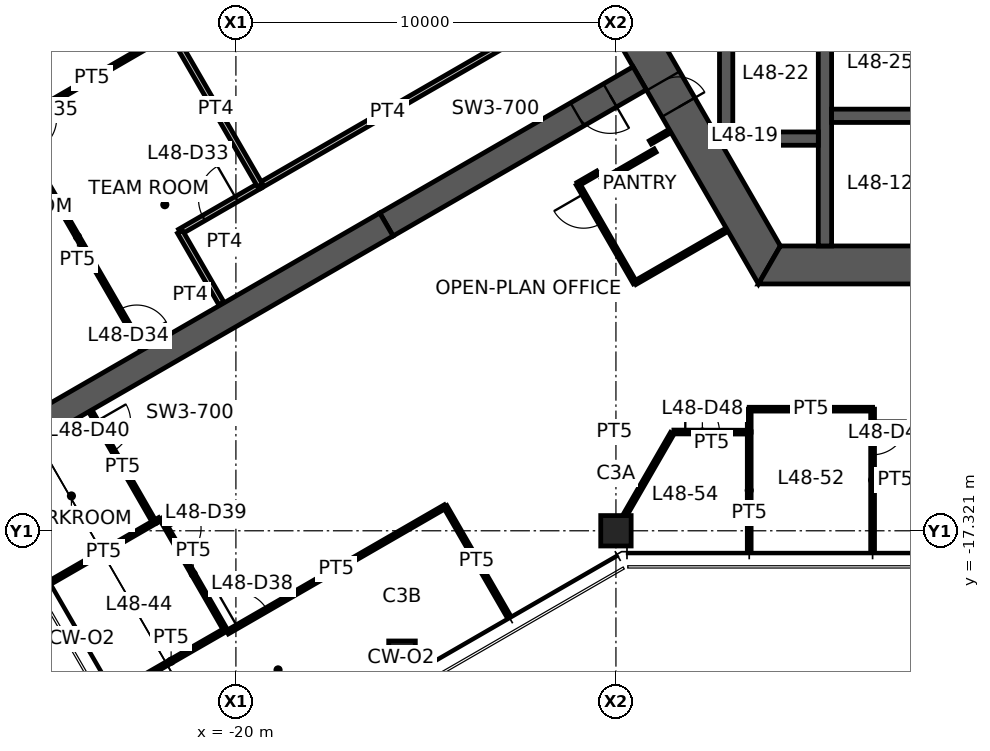
"""IFC4 building model, lengths in metres.
Left out: names, types, materials, properties, quantities, classifications, styles, units other than length and angle.
Written with IfcOpenShell. Run it as: python <this file> out.ifc"""

import sys

from ifc_helpers import new_model, si_unit, direction, frame, frame_2d, origin, origin_2d, place, context, subcontext, project, spatial, polyline, rectangle, hollow_rectangle, outline, extrude, element, fill, save


model = new_model("IFC4")
c1 = context("Model", 3, precision=1e-05, world=origin(), true_north=direction((0.0, 1.0)))
c2 = subcontext(c1, "Body", "Model", "MODEL_VIEW")
j1 = project(units=[si_unit("LENGTHUNIT", "METRE"), si_unit("PLANEANGLEUNIT", "RADIAN")], contexts=[c1])
p1 = place(None, origin())
s1 = spatial("IfcSite", under=j1, at=p1, CompositionType="ELEMENT")
p2 = place(p1, origin())
s2 = spatial("IfcBuilding", under=s1, at=p2, CompositionType="ELEMENT")
p3 = place(p2, frame((0.0, 0.0, 191.6)))
s3 = spatial("IfcBuildingStorey", under=s2, at=p3, CompositionType="ELEMENT", Elevation=191.6)
p4 = place(p3, frame((-10.0, -17.321, 0.0), z_axis=(0.0, 0.0, 1.0), x_axis=(1.0, 0.0, 0.0)))
e1 = element("IfcColumn", 1, at=p4, inside=s3, PredefinedType="COLUMN", context=c2, shape_type="SweptSolid", body=[
    extrude(hollow_rectangle(XDim=0.8, YDim=0.8, WallThickness=0.045, at=origin_2d()), origin(), (0.0, 0.0, 1.0), 3.9),
])
p5 = place(p3, frame((-15.629, -20.571, 0.0), z_axis=(0.0, 0.0, 1.0), x_axis=(1.0, 0.0, 0.0)))
e2 = element("IfcColumn", 2, at=p5, inside=s3, PredefinedType="COLUMN", context=c2, shape_type="SweptSolid", body=[
    extrude(hollow_rectangle(XDim=0.7, YDim=0.7, WallThickness=0.036, at=origin_2d()), origin(), (0.0, 0.0, 1.0), 3.9),
])
p6 = place(p3, frame((-11.922, 0.0, 0.0), z_axis=(0.0, 0.0, 1.0), x_axis=(0.500004296715, -0.866022923061, 0.0)))
e3 = element("IfcWall", 3, at=p6, inside=s3, PredefinedType="SHEAR", context=c2, shape_type="SweptSolid", body=[
    extrude(outline(polyline([(-0.289, -0.5), (6.331, -0.5), (7.131, -0.5), (12.211, -0.5), (11.634, 0.5), (7.131, 0.5), (6.331, 0.5), (0.289, 0.5), (-0.289, -0.5)])), origin(), (0.0, 0.0, 1.0), 3.9),
])
p7 = place(p6, frame((6.331, 0.0, 0.0)))
e4 = element("IfcOpeningElement", 4, at=p7, cuts=e3, PredefinedType="OPENING", context=c2, shape_type="SweptSolid", body=[
    extrude(rectangle(XDim=0.8, YDim=2.1, at=frame_2d((0.4, 1.05))), frame((0.0, 0.51, 0.0), z_axis=(0.0, -1.0, 0.0), x_axis=(1.0, 0.0, 0.0)), (0.0, 0.0, 1.0), 1.02),
])
p8 = place(p3, frame((-5.961, -10.325, 0.0), z_axis=(0.0, 0.0, 1.0), x_axis=(1.0, 0.0, 0.0)))
e5 = element("IfcWall", 5, at=p8, inside=s3, PredefinedType="SHEAR", context=c2, shape_type="SweptSolid", body=[
    extrude(outline(polyline([(-0.289, -0.5), (5.461, -0.5), (6.461, -0.5), (12.211, -0.5), (11.634, 0.5), (6.461, 0.5), (5.461, 0.5), (0.289, 0.5), (-0.289, -0.5)])), origin(), (0.0, 0.0, 1.0), 3.9),
])
p9 = place(p8, frame((5.461, 0.0, 0.0)))
e6 = element("IfcOpeningElement", 6, at=p9, cuts=e5, PredefinedType="OPENING", context=c2, shape_type="SweptSolid", body=[
    extrude(rectangle(XDim=1.0, YDim=2.1, at=frame_2d((0.5, 1.05))), frame((0.0, 0.51, 0.0), z_axis=(0.0, -1.0, 0.0), x_axis=(1.0, 0.0, 0.0)), (0.0, 0.0, 1.0), 1.02),
])
p10 = place(p3, frame((-9.375, -5.413, 0.0), z_axis=(0.0, 0.0, 1.0), x_axis=(-0.866032377459, -0.499987921047, 0.0)))
e7 = element("IfcWall", 7, at=p10, inside=s3, PredefinedType="SHEAR", context=c2, shape_type="SweptSolid", body=[
    extrude(rectangle(XDim=7.696, YDim=0.7, at=frame_2d((3.848, 0.0))), origin(), (0.0, 0.0, 1.0), 3.9),
])
p11 = place(p10, frame((0.9, 0.0, 0.0)))
e8 = element("IfcOpeningElement", 8, at=p11, cuts=e7, PredefinedType="OPENING", context=c2, shape_type="SweptSolid", body=[
    extrude(rectangle(XDim=1.0, YDim=2.1, at=frame_2d((0.5, 1.05))), frame((0.0, 0.36, 0.0), z_axis=(0.0, -1.0, 0.0), x_axis=(1.0, 0.0, 0.0)), (0.0, 0.0, 1.0), 0.72),
])
p12 = place(p3, frame((-16.039, -9.26, 0.0), z_axis=(0.0, 0.0, 1.0), x_axis=(-0.866024837091, -0.50000098154, 0.0)))
e9 = element("IfcWall", 9, at=p12, inside=s3, PredefinedType="SHEAR", context=c2, shape_type="SweptSolid", body=[
    extrude(rectangle(XDim=13.0, YDim=0.7, at=frame_2d((6.5, 0.0))), origin(), (0.0, 0.0, 1.0), 3.9),
])
p13 = place(p3, frame((-4.5, -3.775, 0.0), z_axis=(0.0, 0.0, 1.0), x_axis=(0.0, -1.0, 0.0)))
e10 = element("IfcWall", 10, at=p13, inside=s3, PredefinedType="SHEAR", context=c2, shape_type="SweptSolid", body=[
    extrude(rectangle(XDim=6.05, YDim=0.35, at=frame_2d((3.025, 0.0))), origin(), (0.0, 0.0, 1.0), 3.9),
])
p14 = place(p3, frame((-4.325, -6.4, 0.0), z_axis=(0.0, 0.0, 1.0), x_axis=(1.0, 0.0, 0.0)))
e11 = element("IfcWall", 11, at=p14, inside=s3, PredefinedType="SHEAR", context=c2, shape_type="SweptSolid", body=[
    extrude(rectangle(XDim=2.55, YDim=0.35, at=frame_2d((1.275, 0.0))), origin(), (0.0, 0.0, 1.0), 3.9),
])
p15 = place(p3, frame((-6.925, -7.0, 0.0), z_axis=(0.0, 0.0, 1.0), x_axis=(1.0, 0.0, 0.0)))
e12 = element("IfcWall", 12, at=p15, inside=s3, PredefinedType="SHEAR", context=c2, shape_type="SweptSolid", body=[
    extrude(rectangle(XDim=2.25, YDim=0.35, at=frame_2d((1.125, 0.0))), origin(), (0.0, 0.0, 1.0), 3.9),
])
p16 = place(p3, frame((-7.1, -3.775, 0.0), z_axis=(0.0, 0.0, 1.0), x_axis=(0.0, -1.0, 0.0)))
e13 = element("IfcWall", 13, at=p16, inside=s3, PredefinedType="SHEAR", context=c2, shape_type="SweptSolid", body=[
    extrude(outline(polyline([(0.0, -0.175), (3.274, -0.175), (3.4, 0.0), (3.4, 0.175), (0.0, 0.175), (0.0, -0.175)])), origin(), (0.0, 0.0, 1.0), 3.9),
])
p17 = place(p3, frame((-19.372, -8.24, 0.0), z_axis=(0.0, 0.0, 1.0), x_axis=(0.866015031168, 0.500017965468, 0.0)))
e14 = element("IfcWall", 14, at=p17, inside=s3, PredefinedType="PARTITIONING", context=c2, shape_type="SweptSolid", body=[
    extrude(rectangle(XDim=7.771, YDim=0.15, at=frame_2d((3.886, 0.0))), origin(), (0.0, 0.0, 1.0), 2.95),
])
p18 = place(p3, frame((-21.471, -9.452, 0.0), z_axis=(0.0, 0.0, 1.0), x_axis=(0.866025270247, 0.500000231294, 0.0)))
e15 = element("IfcWall", 15, at=p18, inside=s3, PredefinedType="PARTITIONING", context=c2, shape_type="SweptSolid", body=[
    extrude(rectangle(XDim=2.435, YDim=0.15, at=frame_2d((1.217, 0.0))), origin(), (0.0, 0.0, 1.0), 2.95),
])
p19 = place(p18, frame((0.717, 0.0, 0.0)))
e16 = element("IfcOpeningElement", 16, at=p19, cuts=e15, PredefinedType="OPENING", context=c2, shape_type="SweptSolid", body=[
    extrude(rectangle(XDim=1.0, YDim=2.1, at=frame_2d((0.5, 1.05))), frame((0.0, 0.085, 0.0), z_axis=(0.0, -1.0, 0.0), x_axis=(1.0, 0.0, 0.0)), (0.0, 0.0, 1.0), 0.17),
])
p20 = place(p3, frame((-20.381, -11.34, 0.0), z_axis=(0.0, 0.0, 1.0), x_axis=(-0.500029427677, 0.866008413041, 0.0)))
e17 = element("IfcWall", 17, at=p20, inside=s3, PredefinedType="PARTITIONING", context=c2, shape_type="SweptSolid", body=[
    extrude(rectangle(XDim=2.18, YDim=0.15, at=frame_2d((1.09, 0.0))), origin(), (0.0, 0.0, 1.0), 2.95),
])
p21 = place(p3, frame((-25.878, -6.627, 0.0), z_axis=(0.0, 0.0, 1.0), x_axis=(0.500502111965, -0.865735315162, 0.0)))
e18 = element("IfcWall", 18, at=p21, inside=s3, PredefinedType="PARTITIONING", context=c2, shape_type="SweptSolid", body=[
    extrude(rectangle(XDim=6.83, YDim=0.1, at=frame_2d((3.415, 0.0))), origin(), (0.0, 0.0, 1.0), 2.95),
])
p22 = place(p21, frame((5.63, 0.0, 0.0)))
e19 = element("IfcOpeningElement", 19, at=p22, cuts=e18, PredefinedType="OPENING", context=c2, shape_type="SweptSolid", body=[
    extrude(rectangle(XDim=0.9, YDim=2.1, at=frame_2d((0.45, 1.05))), frame((0.0, 0.06, 0.0), z_axis=(0.0, -1.0, 0.0), x_axis=(1.0, 0.0, 0.0)), (0.0, 0.0, 1.0), 0.12),
])
p23 = place(p3, frame((-21.695, -4.206, 0.0), z_axis=(0.0, 0.0, 1.0), x_axis=(-0.865554211136, -0.500815242963, 0.0)))
e20 = element("IfcWall", 20, at=p23, inside=s3, PredefinedType="PARTITIONING", context=c2, shape_type="SweptSolid", body=[
    extrude(rectangle(XDim=4.833, YDim=0.1, at=frame_2d((2.417, 0.0))), origin(), (0.0, 0.0, 1.0), 2.95),
])
p24 = place(p23, frame((3.633, 0.0, 0.0)))
e21 = element("IfcOpeningElement", 21, at=p24, cuts=e20, PredefinedType="OPENING", context=c2, shape_type="SweptSolid", body=[
    extrude(rectangle(XDim=0.9, YDim=2.1, at=frame_2d((0.45, 1.05))), frame((0.0, 0.06, 0.0), z_axis=(0.0, -1.0, 0.0), x_axis=(1.0, 0.0, 0.0)), (0.0, 0.0, 1.0), 0.12),
])
p25 = place(p3, frame((-19.363, -8.234, 0.0), z_axis=(0.0, 0.0, 1.0), x_axis=(-0.500877035324, 0.865518454734, 0.0)))
e22 = element("IfcWall", 22, at=p25, inside=s3, PredefinedType="PARTITIONING", context=c2, shape_type="SweptSolid", body=[
    extrude(rectangle(XDim=4.654, YDim=0.15, at=frame_2d((2.327, 0.0))), origin(), (0.0, 0.0, 1.0), 2.95),
])
p26 = place(p3, frame((-11.0, -8.198, 0.0), z_axis=(0.0, 0.0, 1.0), x_axis=(0.866131372301, 0.499816412211, 0.0)))
e23 = element("IfcWall", 23, at=p26, inside=s3, PredefinedType="PARTITIONING", context=c2, shape_type="SweptSolid", body=[
    extrude(rectangle(XDim=0.6, YDim=0.1, at=frame_2d((0.3, 0.0))), origin(), (0.0, 0.0, 1.0), 2.95),
])
p27 = place(p3, frame((-10.355, -8.115, 0.0), z_axis=(0.0, 0.0, 1.0), x_axis=(0.866094119867, 0.499880961361, 0.0)))
e24 = element("IfcWall", 24, at=p27, inside=s3, PredefinedType="PARTITIONING", context=c2, shape_type="SweptSolid", body=[
    extrude(rectangle(XDim=1.6, YDim=0.1, at=frame_2d((0.8, 0.0))), origin(), (0.0, 0.0, 1.0), 2.95),
])
p28 = place(p3, frame((-9.5, -10.796, 0.0), z_axis=(0.0, 0.0, 1.0), x_axis=(-0.499990139034, 0.866031096941, 0.0)))
e25 = element("IfcWall", 25, at=p28, inside=s3, PredefinedType="PARTITIONING", context=c2, shape_type="SweptSolid", body=[
    extrude(rectangle(XDim=3.0, YDim=0.1, at=frame_2d((1.5, 0.0))), origin(), (0.0, 0.0, 1.0), 2.95),
])
p29 = place(p28, frame((1.8, 0.0, 0.0)))
e26 = element("IfcOpeningElement", 26, at=p29, cuts=e25, PredefinedType="OPENING", context=c2, shape_type="SweptSolid", body=[
    extrude(rectangle(XDim=0.9, YDim=2.1, at=frame_2d((0.45, 1.05))), frame((0.0, 0.06, 0.0), z_axis=(0.0, -1.0, 0.0), x_axis=(1.0, 0.0, 0.0)), (0.0, 0.0, 1.0), 0.12),
])
p30 = place(p3, frame((-9.094, -7.098, 0.0), z_axis=(0.0, 0.0, 1.0), x_axis=(0.865954211699, 0.50012328804, 0.0)))
e27 = element("IfcWall", 27, at=p30, inside=s3, PredefinedType="PARTITIONING", context=c2, shape_type="SweptSolid", body=[
    extrude(rectangle(XDim=0.58, YDim=0.1, at=frame_2d((0.29, 0.0))), origin(), (0.0, 0.0, 1.0), 2.95),
])
p31 = place(p3, frame((-7.092, -9.406, 0.0), z_axis=(0.0, 0.0, 1.0), x_axis=(-0.86603494908, -0.499983466698, 0.0)))
e28 = element("IfcWall", 28, at=p31, inside=s3, PredefinedType="PARTITIONING", context=c2, shape_type="SweptSolid", body=[
    extrude(rectangle(XDim=2.78, YDim=0.1, at=frame_2d((1.39, 0.0))), origin(), (0.0, 0.0, 1.0), 2.95),
])
p32 = place(p3, frame((-23.137, -21.576, 0.0), z_axis=(0.0, 0.0, 1.0), x_axis=(0.866702770653, 0.498824926544, 0.0)))
e29 = element("IfcWall", 29, at=p32, inside=s3, PredefinedType="PARTITIONING", context=c2, shape_type="SweptSolid", body=[
    extrude(rectangle(XDim=3.306, YDim=0.1, at=frame_2d((1.653, 0.0))), origin(), (0.0, 0.0, 1.0), 2.95),
])
p33 = place(p3, frame((-20.225, -19.991, 0.0), z_axis=(0.0, 0.0, 1.0), x_axis=(0.866030817826, 0.499990622488, 0.0)))
e30 = element("IfcWall", 30, at=p33, inside=s3, PredefinedType="PARTITIONING", context=c2, shape_type="SweptSolid", body=[
    extrude(rectangle(XDim=6.62, YDim=0.1, at=frame_2d((3.31, 0.0))), origin(), (0.0, 0.0, 1.0), 2.95),
])
p34 = place(p33, frame((0.3, 0.0, 0.0)))
e31 = element("IfcOpeningElement", 31, at=p34, cuts=e30, PredefinedType="OPENING", context=c2, shape_type="SweptSolid", body=[
    extrude(rectangle(XDim=0.9, YDim=2.1, at=frame_2d((0.45, 1.05))), frame((0.0, 0.06, 0.0), z_axis=(0.0, -1.0, 0.0), x_axis=(1.0, 0.0, 0.0)), (0.0, 0.0, 1.0), 0.12),
])
p35 = place(p3, frame((-14.492, -16.681, 0.0), z_axis=(0.0, 0.0, 1.0), x_axis=(0.500008057651, -0.866020751647, 0.0)))
e32 = element("IfcWall", 32, at=p35, inside=s3, PredefinedType="PARTITIONING", context=c2, shape_type="SweptSolid", body=[
    extrude(rectangle(XDim=3.305, YDim=0.1, at=frame_2d((1.653, 0.0))), origin(), (0.0, 0.0, 1.0), 2.95),
])
p36 = place(p3, frame((-24.829, -18.646, 0.0), z_axis=(0.0, 0.0, 1.0), x_axis=(0.866002566612, 0.500039553057, 0.0)))
e33 = element("IfcWall", 33, at=p36, inside=s3, PredefinedType="PARTITIONING", context=c2, shape_type="SweptSolid", body=[
    extrude(rectangle(XDim=3.11, YDim=0.1, at=frame_2d((1.555, 0.0))), origin(), (0.0, 0.0, 1.0), 2.95),
])
p37 = place(p3, frame((-21.967, -16.993, 0.0), z_axis=(0.0, 0.0, 1.0), x_axis=(0.498972655929, -0.866617729241, 0.0)))
e34 = element("IfcWall", 34, at=p37, inside=s3, PredefinedType="PARTITIONING", context=c2, shape_type="SweptSolid", body=[
    extrude(rectangle(XDim=3.383, YDim=0.1, at=frame_2d((1.692, 0.0))), origin(), (0.0, 0.0, 1.0), 2.95),
])
p38 = place(p37, frame((0.3, 0.0, 0.0)))
e35 = element("IfcOpeningElement", 35, at=p38, cuts=e34, PredefinedType="OPENING", context=c2, shape_type="SweptSolid", body=[
    extrude(rectangle(XDim=0.9, YDim=2.1, at=frame_2d((0.45, 1.05))), frame((0.0, 0.06, 0.0), z_axis=(0.0, -1.0, 0.0), x_axis=(1.0, 0.0, 0.0)), (0.0, 0.0, 1.0), 0.12),
])
p39 = place(p3, frame((-23.822, -14.181, 0.0), z_axis=(0.0, 0.0, 1.0), x_axis=(0.498880193261, -0.866670959922, 0.0)))
e36 = element("IfcWall", 36, at=p39, inside=s3, PredefinedType="PARTITIONING", context=c2, shape_type="SweptSolid", body=[
    extrude(rectangle(XDim=3.364, YDim=0.1, at=frame_2d((1.682, 0.0))), origin(), (0.0, 0.0, 1.0), 2.95),
])
p40 = place(p39, frame((0.3, 0.0, 0.0)))
e37 = element("IfcOpeningElement", 37, at=p40, cuts=e36, PredefinedType="OPENING", context=c2, shape_type="SweptSolid", body=[
    extrude(rectangle(XDim=0.9, YDim=2.1, at=frame_2d((0.45, 1.05))), frame((0.0, 0.06, 0.0), z_axis=(0.0, -1.0, 0.0), x_axis=(1.0, 0.0, 0.0)), (0.0, 0.0, 1.0), 0.12),
])
p41 = place(p3, frame((-6.493, -17.801, 0.0), z_axis=(0.0, 0.0, 1.0), x_axis=(0.0, 1.0, 0.0)))
e38 = element("IfcWall", 38, at=p41, inside=s3, PredefinedType="PARTITIONING", context=c2, shape_type="SweptSolid", body=[
    extrude(rectangle(XDim=3.085, YDim=0.1, at=frame_2d((1.542, 0.0))), origin(), (0.0, 0.0, 1.0), 2.95),
])
p42 = place(p3, frame((-6.493, -14.725, 0.0), z_axis=(0.0, 0.0, 1.0), x_axis=(0.0, 1.0, 0.0)))
e39 = element("IfcWall", 39, at=p42, inside=s3, PredefinedType="PARTITIONING", context=c2, shape_type="SweptSolid", body=[
    extrude(rectangle(XDim=0.604, YDim=0.1, at=frame_2d((0.302, 0.0))), origin(), (0.0, 0.0, 1.0), 2.95),
])
p43 = place(p3, frame((-6.493, -14.121, 0.0), z_axis=(0.0, 0.0, 1.0), x_axis=(1.0, 0.0, 0.0)))
e40 = element("IfcWall", 40, at=p43, inside=s3, PredefinedType="PARTITIONING", context=c2, shape_type="SweptSolid", body=[
    extrude(rectangle(XDim=3.247, YDim=0.1, at=frame_2d((1.623, 0.0))), origin(), (0.0, 0.0, 1.0), 2.95),
])
p44 = place(p3, frame((-3.246, -14.121, 0.0), z_axis=(0.0, 0.0, 1.0), x_axis=(0.0, -1.0, 0.0)))
e41 = element("IfcWall", 41, at=p44, inside=s3, PredefinedType="PARTITIONING", context=c2, shape_type="SweptSolid", body=[
    extrude(rectangle(XDim=3.73, YDim=0.1, at=frame_2d((1.865, 0.0))), origin(), (0.0, 0.0, 1.0), 2.95),
])
p45 = place(p44, frame((0.3, 0.0, 0.0)))
e42 = element("IfcOpeningElement", 42, at=p45, cuts=e41, PredefinedType="OPENING", context=c2, shape_type="SweptSolid", body=[
    extrude(rectangle(XDim=0.9, YDim=2.1, at=frame_2d((0.45, 1.05))), frame((0.0, 0.06, 0.0), z_axis=(0.0, -1.0, 0.0), x_axis=(1.0, 0.0, 0.0)), (0.0, 0.0, 1.0), 0.12),
])
p46 = place(p3, frame((-8.476, -14.72, 0.0), z_axis=(0.0, 0.0, 1.0), x_axis=(0.99999726379, -0.002339318888, 0.0)))
e43 = element("IfcWall", 43, at=p46, inside=s3, PredefinedType="PARTITIONING", context=c2, shape_type="SweptSolid", body=[
    extrude(rectangle(XDim=1.983, YDim=0.1, at=frame_2d((0.991, 0.0))), origin(), (0.0, 0.0, 1.0), 2.95),
])
p47 = place(p46, frame((0.3, 0.0, 0.0)))
e44 = element("IfcOpeningElement", 44, at=p47, cuts=e43, PredefinedType="OPENING", context=c2, shape_type="SweptSolid", body=[
    extrude(rectangle(XDim=0.9, YDim=2.1, at=frame_2d((0.45, 1.05))), frame((0.0, 0.06, 0.0), z_axis=(0.0, -1.0, 0.0), x_axis=(1.0, 0.0, 0.0)), (0.0, 0.0, 1.0), 0.12),
])
p48 = place(p3, frame((-22.01, -17.018, 0.0), z_axis=(0.0, 0.0, 1.0), x_axis=(-0.866224454185, -0.499655075999, 0.0)))
e45 = element("IfcWall", 45, at=p48, inside=s3, PredefinedType="PARTITIONING", context=c2, shape_type="SweptSolid", body=[
    extrude(rectangle(XDim=0.104, YDim=0.1, at=frame_2d((0.052, 0.0))), origin(), (0.0, 0.0, 1.0), 2.95),
])
p49 = place(p3, frame((-9.759, -16.904, 0.0), z_axis=(0.0, 0.0, 1.0), x_axis=(0.500049399443, 0.865996881124, 0.0)))
e46 = element("IfcWall", 46, at=p49, inside=s3, PredefinedType="PARTITIONING", context=c2, shape_type="SweptSolid", body=[
    extrude(rectangle(XDim=2.478, YDim=0.1, at=frame_2d((1.239, 0.0))), origin(), (0.0, 0.0, 1.0), 2.95),
])
p50 = place(p7, origin())
e47 = element("IfcDoor", 47, at=p50, inside=s3, OperationType="SINGLE_SWING_RIGHT", PredefinedType="DOOR", context=c2, shape_type="SweptSolid", body=[
    extrude(rectangle(XDim=0.8, YDim=2.1, at=frame_2d((0.4, 1.05))), frame((0.0, 0.025, 0.0), z_axis=(0.0, -1.0, 0.0), x_axis=(1.0, 0.0, 0.0)), (0.0, 0.0, 1.0), 0.05),
])
fill(e4, e47)
p51 = place(p11, origin())
e48 = element("IfcDoor", 48, at=p51, inside=s3, OperationType="SINGLE_SWING_LEFT", PredefinedType="DOOR", context=c2, shape_type="SweptSolid", body=[
    extrude(rectangle(XDim=1.0, YDim=2.1, at=frame_2d((0.5, 1.05))), frame((0.0, 0.025, 0.0), z_axis=(0.0, -1.0, 0.0), x_axis=(1.0, 0.0, 0.0)), (0.0, 0.0, 1.0), 0.05),
])
fill(e8, e48)
p52 = place(p19, origin())
e49 = element("IfcDoor", 49, at=p52, inside=s3, OperationType="SINGLE_SWING_RIGHT", PredefinedType="DOOR", context=c2, shape_type="SweptSolid", body=[
    extrude(rectangle(XDim=1.0, YDim=2.1, at=frame_2d((0.5, 1.05))), frame((0.0, 0.025, 0.0), z_axis=(0.0, -1.0, 0.0), x_axis=(1.0, 0.0, 0.0)), (0.0, 0.0, 1.0), 0.05),
])
fill(e16, e49)
p53 = place(p22, origin())
e50 = element("IfcDoor", 50, at=p53, inside=s3, OperationType="SINGLE_SWING_RIGHT", PredefinedType="DOOR", context=c2, shape_type="SweptSolid", body=[
    extrude(rectangle(XDim=0.9, YDim=2.1, at=frame_2d((0.45, 1.05))), frame((0.0, 0.025, 0.0), z_axis=(0.0, -1.0, 0.0), x_axis=(1.0, 0.0, 0.0)), (0.0, 0.0, 1.0), 0.05),
])
fill(e19, e50)
p54 = place(p24, origin())
e51 = element("IfcDoor", 51, at=p54, inside=s3, OperationType="SINGLE_SWING_RIGHT", PredefinedType="DOOR", context=c2, shape_type="SweptSolid", body=[
    extrude(rectangle(XDim=0.9, YDim=2.1, at=frame_2d((0.45, 1.05))), frame((0.0, 0.025, 0.0), z_axis=(0.0, -1.0, 0.0), x_axis=(1.0, 0.0, 0.0)), (0.0, 0.0, 1.0), 0.05),
])
fill(e21, e51)
p55 = place(p29, origin())
e52 = element("IfcDoor", 52, at=p55, inside=s3, OperationType="SINGLE_SWING_RIGHT", PredefinedType="DOOR", context=c2, shape_type="SweptSolid", body=[
    extrude(rectangle(XDim=0.9, YDim=2.1, at=frame_2d((0.45, 1.05))), frame((0.0, 0.025, 0.0), z_axis=(0.0, -1.0, 0.0), x_axis=(1.0, 0.0, 0.0)), (0.0, 0.0, 1.0), 0.05),
])
fill(e26, e52)
p56 = place(p34, origin())
e53 = element("IfcDoor", 53, at=p56, inside=s3, OperationType="SINGLE_SWING_LEFT", PredefinedType="DOOR", context=c2, shape_type="SweptSolid", body=[
    extrude(rectangle(XDim=0.9, YDim=2.1, at=frame_2d((0.45, 1.05))), frame((0.0, 0.025, 0.0), z_axis=(0.0, -1.0, 0.0), x_axis=(1.0, 0.0, 0.0)), (0.0, 0.0, 1.0), 0.05),
])
fill(e31, e53)
p57 = place(p38, origin())
e54 = element("IfcDoor", 54, at=p57, inside=s3, OperationType="SINGLE_SWING_LEFT", PredefinedType="DOOR", context=c2, shape_type="SweptSolid", body=[
    extrude(rectangle(XDim=0.9, YDim=2.1, at=frame_2d((0.45, 1.05))), frame((0.0, 0.025, 0.0), z_axis=(0.0, -1.0, 0.0), x_axis=(1.0, 0.0, 0.0)), (0.0, 0.0, 1.0), 0.05),
])
fill(e35, e54)
p58 = place(p40, origin())
e55 = element("IfcDoor", 55, at=p58, inside=s3, OperationType="SINGLE_SWING_LEFT", PredefinedType="DOOR", context=c2, shape_type="SweptSolid", body=[
    extrude(rectangle(XDim=0.9, YDim=2.1, at=frame_2d((0.45, 1.05))), frame((0.0, 0.025, 0.0), z_axis=(0.0, -1.0, 0.0), x_axis=(1.0, 0.0, 0.0)), (0.0, 0.0, 1.0), 0.05),
])
fill(e37, e55)
p59 = place(p45, origin())
e56 = element("IfcDoor", 56, at=p59, inside=s3, OperationType="SINGLE_SWING_LEFT", PredefinedType="DOOR", context=c2, shape_type="SweptSolid", body=[
    extrude(rectangle(XDim=0.9, YDim=2.1, at=frame_2d((0.45, 1.05))), frame((0.0, 0.025, 0.0), z_axis=(0.0, -1.0, 0.0), x_axis=(1.0, 0.0, 0.0)), (0.0, 0.0, 1.0), 0.05),
])
fill(e42, e56)
p60 = place(p47, origin())
e57 = element("IfcDoor", 57, at=p60, inside=s3, OperationType="SINGLE_SWING_LEFT", PredefinedType="DOOR", context=c2, shape_type="SweptSolid", body=[
    extrude(rectangle(XDim=0.9, YDim=2.1, at=frame_2d((0.45, 1.05))), frame((0.0, 0.025, 0.0), z_axis=(0.0, -1.0, 0.0), x_axis=(1.0, 0.0, 0.0)), (0.0, 0.0, 1.0), 0.05),
])
fill(e44, e57)
save(model, sys.argv[1])
